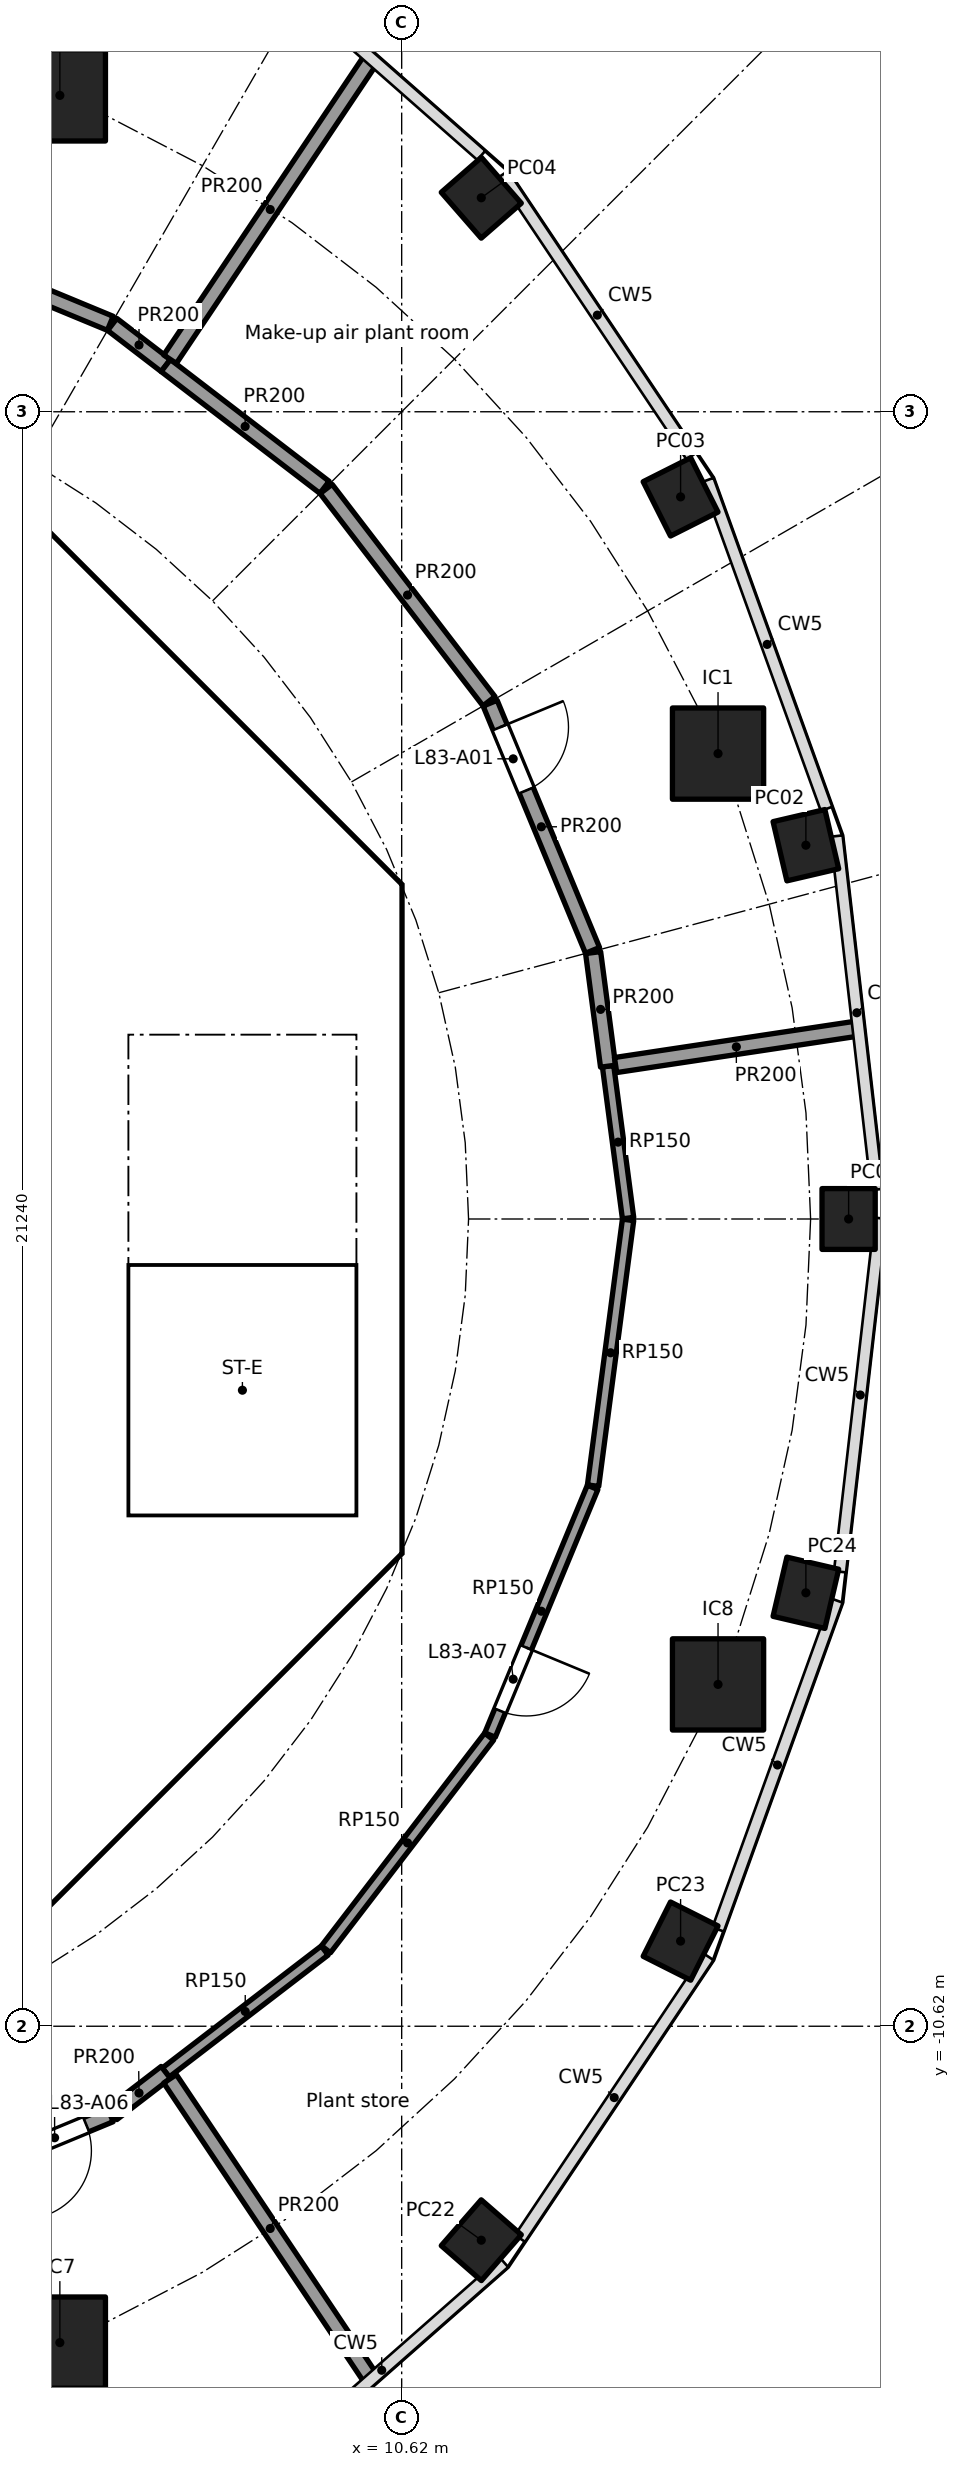
"""IFC4 building model, lengths in metres.
Left out: names, types, materials, properties, quantities, classifications, styles, units other than length and angle.
Written with IfcOpenShell. Run it as: python <this file> out.ifc"""

import sys

from ifc_helpers import new_model, si_unit, direction, frame, frame_2d, origin, origin_2d, place, context, subcontext, project, spatial, polyline, rectangle, hollow_rectangle, outline, extrude, element, fill, save


model = new_model("IFC4")
c1 = context("Model", 3, precision=1e-05, world=origin(), true_north=direction((0.0, 1.0)))
c2 = subcontext(c1, "Body", "Model", "MODEL_VIEW")
j1 = project(units=[si_unit("LENGTHUNIT", "METRE"), si_unit("PLANEANGLEUNIT", "RADIAN")], contexts=[c1])
p1 = place(None, origin())
s1 = spatial("IfcSite", under=j1, at=p1, CompositionType="ELEMENT")
p2 = place(p1, origin())
s2 = spatial("IfcBuilding", under=s1, at=p2, CompositionType="ELEMENT")
p3 = place(p2, frame((0.0, 0.0, 336.9)))
s3 = spatial("IfcBuildingStorey", under=s2, at=p3, CompositionType="ELEMENT", Elevation=336.9)
for number, where, z_axis, x_axis in (
    (1, (16.5, 0.0, 0.0), (0.0, 0.0, 1.0), (0.0, 1.0, 0.0)),
    (2, (15.938, 4.917, 0.0), (0.0, 0.0, 1.0), (-0.227, 0.974, 0.0)),
    (3, (14.289, 9.5, 0.0), (0.0, 0.0, 1.0), (-0.45, 0.893, 0.0)),
    (4, (11.667, 13.435, 0.0), (0.0, 0.0, 1.0), (-0.657, 0.754, 0.0)),
    (5, (11.667, -13.435, 0.0), (0.0, 0.0, 1.0), (0.657, 0.754, 0.0)),
    (6, (14.289, -9.5, 0.0), (0.0, 0.0, 1.0), (0.45, 0.893, 0.0)),
    (7, (15.938, -4.917, 0.0), (0.0, 0.0, 1.0), (0.227, 0.974, 0.0)),
):
    element("IfcColumn", number, at=place(p3, frame(where, z_axis=z_axis, x_axis=x_axis)), inside=s3, PredefinedType="COLUMN", context=c2, shape_type="SweptSolid", body=[
        extrude(hollow_rectangle(XDim=0.8, YDim=0.7, WallThickness=0.025, at=origin_2d()), origin(), (0.0, 0.0, 1.0), 4.0),
    ])
for number, where, z_axis, x_axis in (
    (8, (14.782, 6.123, 0.0), (0.0, 0.0, 1.0), (1.0, 0.0, 0.0)),
    (9, (6.123, 14.782, 0.0), (0.0, 0.0, 1.0), (1.0, 0.0, 0.0)),
    (10, (6.123, -14.782, 0.0), (0.0, 0.0, 1.0), (1.0, 0.0, 0.0)),
    (11, (14.782, -6.123, 0.0), (0.0, 0.0, 1.0), (1.0, 0.0, 0.0)),
):
    element("IfcColumn", number, at=place(p3, frame(where, z_axis=z_axis, x_axis=x_axis)), inside=s3, PredefinedType="COLUMN", context=c2, shape_type="SweptSolid", body=[
        extrude(rectangle(XDim=1.2, YDim=1.2, at=origin_2d()), origin(), (0.0, 0.0, 1.0), 4.0),
    ])
p4 = place(p3, frame((9.988, 4.613, 0.0), z_axis=(0.0, 0.0, 1.0), x_axis=(-0.707106781187, 0.707106781187, 0.0)))
e12 = element("IfcWall", 12, at=p4, inside=s3, PredefinedType="SHEAR", context=c2, shape_type="SweptSolid", body=[
    extrude(rectangle(XDim=7.602, YDim=0.6, at=frame_2d((3.801, 0.0))), origin(), (0.0, 0.0, 1.0), 3.7),
])
p5 = place(p4, frame((3.201, 0.0, 0.0)))
e13 = element("IfcOpeningElement", 13, at=p5, cuts=e12, PredefinedType="OPENING", context=c2, shape_type="SweptSolid", body=[
    extrude(rectangle(XDim=1.2, YDim=2.1, at=frame_2d((0.6, 1.05))), frame((0.0, 0.31, 0.0), z_axis=(0.0, -1.0, 0.0), x_axis=(1.0, 0.0, 0.0)), (0.0, 0.0, 1.0), 0.62),
])
p6 = place(p3, frame((4.613, -9.988, 0.0), z_axis=(0.0, 0.0, 1.0), x_axis=(0.707106781187, 0.707106781187, 0.0)))
e14 = element("IfcWall", 14, at=p6, inside=s3, PredefinedType="SHEAR", context=c2, shape_type="SweptSolid", body=[
    extrude(rectangle(XDim=7.602, YDim=0.6, at=frame_2d((3.801, 0.0))), origin(), (0.0, 0.0, 1.0), 3.7),
])
p7 = place(p6, frame((3.201, 0.0, 0.0)))
e15 = element("IfcOpeningElement", 15, at=p7, cuts=e14, PredefinedType="OPENING", context=c2, shape_type="SweptSolid", body=[
    extrude(rectangle(XDim=1.2, YDim=2.1, at=frame_2d((0.6, 1.05))), frame((0.0, 0.31, 0.0), z_axis=(0.0, -1.0, 0.0), x_axis=(1.0, 0.0, 0.0)), (0.0, 0.0, 1.0), 0.62),
])
p8 = place(p3, frame((-6.7, 2.0, 0.0), z_axis=(0.0, 0.0, 1.0), x_axis=(1.0, 0.0, 0.0)))
e16 = element("IfcWall", 16, at=p8, inside=s3, PredefinedType="SOLIDWALL", context=c2, shape_type="SweptSolid", body=[
    extrude(rectangle(XDim=13.4, YDim=0.2, at=frame_2d((6.7, 0.0))), origin(), (0.0, 0.0, 1.0), 3.7),
])
p9 = place(p8, frame((2.95, 0.0, 0.0)))
e17 = element("IfcOpeningElement", 17, at=p9, cuts=e16, PredefinedType="OPENING", context=c2, shape_type="SweptSolid", body=[
    extrude(rectangle(XDim=0.9, YDim=2.1, at=frame_2d((0.45, 1.05))), frame((0.0, 0.11, 0.0), z_axis=(0.0, -1.0, 0.0), x_axis=(1.0, 0.0, 0.0)), (0.0, 0.0, 1.0), 0.22),
])
p10 = place(p8, frame((8.45, 0.0, 0.0)))
e18 = element("IfcOpeningElement", 18, at=p10, cuts=e16, PredefinedType="OPENING", context=c2, shape_type="SweptSolid", body=[
    extrude(rectangle(XDim=0.9, YDim=2.1, at=frame_2d((0.45, 1.05))), frame((0.0, 0.11, 0.0), z_axis=(0.0, -1.0, 0.0), x_axis=(1.0, 0.0, 0.0)), (0.0, 0.0, 1.0), 0.22),
])
p11 = place(p8, frame((11.75, 0.0, 0.0)))
e19 = element("IfcOpeningElement", 19, at=p11, cuts=e16, PredefinedType="OPENING", context=c2, shape_type="SweptSolid", body=[
    extrude(rectangle(XDim=0.9, YDim=2.1, at=frame_2d((0.45, 1.05))), frame((0.0, 0.11, 0.0), z_axis=(0.0, -1.0, 0.0), x_axis=(1.0, 0.0, 0.0)), (0.0, 0.0, 1.0), 0.22),
])
p12 = place(p3, frame((6.7, 4.0, 0.0), z_axis=(0.0, 0.0, 1.0), x_axis=(1.0, 0.0, 0.0)))
e20 = element("IfcWall", 20, at=p12, inside=s3, PredefinedType="SOLIDWALL", context=c2, shape_type="SweptSolid", body=[
    extrude(rectangle(XDim=3.325, YDim=0.2, at=frame_2d((1.662, 0.0))), origin(), (0.0, 0.0, 1.0), 3.7),
])
p13 = place(p12, frame((1.25, 0.0, 0.0)))
e21 = element("IfcOpeningElement", 21, at=p13, cuts=e20, PredefinedType="OPENING", context=c2, shape_type="SweptSolid", body=[
    extrude(rectangle(XDim=1.1, YDim=2.1, at=frame_2d((0.55, 1.05))), frame((0.0, 0.11, 0.0), z_axis=(0.0, -1.0, 0.0), x_axis=(1.0, 0.0, 0.0)), (0.0, 0.0, 1.0), 0.22),
])
p14 = place(p3, frame((-6.7, -2.0, 0.0), z_axis=(0.0, 0.0, 1.0), x_axis=(1.0, 0.0, 0.0)))
e22 = element("IfcWall", 22, at=p14, inside=s3, PredefinedType="SOLIDWALL", context=c2, shape_type="SweptSolid", body=[
    extrude(rectangle(XDim=13.4, YDim=0.2, at=frame_2d((6.7, 0.0))), origin(), (0.0, 0.0, 1.0), 3.7),
])
p15 = place(p14, frame((1.85, 0.0, 0.0)))
e23 = element("IfcOpeningElement", 23, at=p15, cuts=e22, PredefinedType="OPENING", context=c2, shape_type="SweptSolid", body=[
    extrude(rectangle(XDim=0.9, YDim=2.1, at=frame_2d((0.45, 1.05))), frame((0.0, 0.11, 0.0), z_axis=(0.0, -1.0, 0.0), x_axis=(1.0, 0.0, 0.0)), (0.0, 0.0, 1.0), 0.22),
])
p16 = place(p14, frame((6.25, 0.0, 0.0)))
e24 = element("IfcOpeningElement", 24, at=p16, cuts=e22, PredefinedType="OPENING", context=c2, shape_type="SweptSolid", body=[
    extrude(rectangle(XDim=0.9, YDim=2.1, at=frame_2d((0.45, 1.05))), frame((0.0, 0.11, 0.0), z_axis=(0.0, -1.0, 0.0), x_axis=(1.0, 0.0, 0.0)), (0.0, 0.0, 1.0), 0.22),
])
p17 = place(p14, frame((10.65, 0.0, 0.0)))
e25 = element("IfcOpeningElement", 25, at=p17, cuts=e22, PredefinedType="OPENING", context=c2, shape_type="SweptSolid", body=[
    extrude(rectangle(XDim=0.9, YDim=2.1, at=frame_2d((0.45, 1.05))), frame((0.0, 0.11, 0.0), z_axis=(0.0, -1.0, 0.0), x_axis=(1.0, 0.0, 0.0)), (0.0, 0.0, 1.0), 0.22),
])
p18 = place(p3, origin())
e26 = element("IfcWall", 26, at=p18, inside=s3, PredefinedType="SHEAR", context=c2, shape_type="SweptSolid", body=[
    extrude(outline(polyline([(9.776, -4.401), (10.025, -4.152), (10.025, -3.801), (10.025, 4.152), (9.776, 4.401), (10.2, 4.825), (10.625, 4.401), (10.625, -4.401), (10.2, -4.825), (9.776, -4.401)])), origin(), (0.0, 0.0, 1.0), 3.7),
])
p19 = place(p3, origin())
e27 = element("IfcWall", 27, at=p19, inside=s3, PredefinedType="SOLIDWALL", context=c2, shape_type="SweptSolid", body=[
    extrude(outline(polyline([(-6.7, -2.1), (-6.5, -2.1), (-6.5, -4.1), (-2.3, -4.1), (-2.3, -2.1), (-2.1, -2.1), (-2.1, -4.1), (2.1, -4.1), (2.1, -2.1), (2.3, -2.1), (2.3, -4.1), (6.5, -4.1), (6.5, -2.1), (6.7, -2.1), (6.7, -4.3), (-6.7, -4.3), (-6.7, -2.1)])), origin(), (0.0, 0.0, 1.0), 3.7),
])
p20 = place(p3, origin())
e28 = element("IfcWall", 28, at=p20, inside=s3, PredefinedType="SOLIDWALL", context=c2, shape_type="SweptSolid", body=[
    extrude(outline(polyline([(-6.7, 4.3), (6.7, 4.3), (6.7, 2.1), (6.5, 2.1), (6.5, 4.1), (4.5, 4.1), (4.5, 2.1), (4.3, 2.1), (4.3, 4.1), (0.1, 4.1), (0.1, 2.1), (-0.1, 2.1), (-0.1, 4.1), (-6.5, 4.1), (-6.5, 2.1), (-6.7, 2.1), (-6.7, 4.3)])), origin(), (0.0, 0.0, 1.0), 3.7),
])
p21 = place(p3, origin())
e29 = element("IfcWall", 29, at=p21, inside=s3, PredefinedType="SOLIDWALL", context=c2, shape_type="SweptSolid", body=[
    extrude(outline(polyline([(7.025, -3.9), (6.7, -3.9), (6.7, 3.9), (7.025, 3.9), (7.025, -3.9)])), origin(), (0.0, 0.0, 1.0), 3.7),
])
p22 = place(p3, origin())
e30 = element("IfcWall", 30, at=p22, inside=s3, PredefinedType="SOLIDWALL", context=c2, shape_type="SweptSolid", body=[
    extrude(outline(polyline([(10.025, -4.1), (6.7, -4.1), (6.7, -3.9), (10.025, -3.9), (10.025, -4.1)])), origin(), (0.0, 0.0, 1.0), 3.7),
])
p23 = place(p3, frame((9.607, -9.624, 0.0), z_axis=(0.0, 0.0, 1.0), x_axis=(-0.793381127635, -0.608725214126, 0.0)))
e31 = element("IfcWall", 31, at=p23, inside=s3, PredefinedType="PARTITIONING", context=c2, shape_type="SweptSolid", body=[
    extrude(rectangle(XDim=2.635, YDim=0.15, at=frame_2d((1.317, 0.0))), origin(), (0.0, 0.0, 1.0), 3.7),
])
p24 = place(p3, frame((11.771, -6.809, 0.0), z_axis=(0.0, 0.0, 1.0), x_axis=(-0.608736710054, -0.793372307201, 0.0)))
e32 = element("IfcWall", 32, at=p24, inside=s3, PredefinedType="PARTITIONING", context=c2, shape_type="SweptSolid", body=[
    extrude(rectangle(XDim=3.527, YDim=0.15, at=frame_2d((1.763, 0.0))), origin(), (0.0, 0.0, 1.0), 3.7),
])
p25 = place(p3, frame((13.132, -3.531, 0.0), z_axis=(0.0, 0.0, 1.0), x_axis=(-0.382677866108, -0.923881838111, 0.0)))
e33 = element("IfcWall", 33, at=p25, inside=s3, PredefinedType="PARTITIONING", context=c2, shape_type="SweptSolid", body=[
    extrude(rectangle(XDim=3.527, YDim=0.15, at=frame_2d((1.763, 0.0))), origin(), (0.0, 0.0, 1.0), 3.7),
])
p26 = place(p25, frame((2.281, 0.0, 0.0)))
e34 = element("IfcOpeningElement", 34, at=p26, cuts=e33, PredefinedType="OPENING", context=c2, shape_type="SweptSolid", body=[
    extrude(rectangle(XDim=0.9, YDim=2.1, at=frame_2d((0.45, 1.05))), frame((0.0, 0.085, 0.0), z_axis=(0.0, -1.0, 0.0), x_axis=(1.0, 0.0, 0.0)), (0.0, 0.0, 1.0), 0.17),
])
p27 = place(p3, frame((13.335, 2.01, 0.0), z_axis=(0.0, 0.0, 1.0), x_axis=(0.130545357325, -0.991442338051, 0.0)))
e35 = element("IfcWall", 35, at=p27, inside=s3, PredefinedType="PARTITIONING", context=c2, shape_type="SweptSolid", body=[
    extrude(rectangle(XDim=2.016, YDim=0.15, at=frame_2d((1.008, 0.0))), origin(), (0.0, 0.0, 1.0), 3.7),
])
p28 = place(p3, frame((13.598, -0.012, 0.0), z_axis=(0.0, 0.0, 1.0), x_axis=(-0.130499283623, -0.991448403586, 0.0)))
e36 = element("IfcWall", 36, at=p28, inside=s3, PredefinedType="PARTITIONING", context=c2, shape_type="SweptSolid", body=[
    extrude(rectangle(XDim=3.527, YDim=0.15, at=frame_2d((1.763, 0.0))), origin(), (0.0, 0.0, 1.0), 3.7),
])
p29 = place(p3, frame((3.534, 13.131, 0.0), z_axis=(0.0, 0.0, 1.0), x_axis=(0.92386297064, -0.382723413813, 0.0)))
e37 = element("IfcWall", 37, at=p29, inside=s3, PredefinedType="PARTITIONING", context=c2, shape_type="SweptSolid", body=[
    extrude(rectangle(XDim=3.52, YDim=0.2, at=frame_2d((1.76, 0.0))), origin(), (0.0, 0.0, 1.0), 3.7),
])
p30 = place(p3, frame((6.786, -11.784, 0.0), z_axis=(0.0, 0.0, 1.0), x_axis=(-0.92386297064, -0.382723413813, 0.0)))
e38 = element("IfcWall", 38, at=p30, inside=s3, PredefinedType="PARTITIONING", context=c2, shape_type="SweptSolid", body=[
    extrude(rectangle(XDim=3.52, YDim=0.2, at=frame_2d((1.76, 0.0))), origin(), (0.0, 0.0, 1.0), 3.7),
])
p31 = place(p30, frame((0.342, 0.0, 0.0)))
e39 = element("IfcOpeningElement", 39, at=p31, cuts=e38, PredefinedType="OPENING", context=c2, shape_type="SweptSolid", body=[
    extrude(rectangle(XDim=0.9, YDim=2.1, at=frame_2d((0.45, 1.05))), frame((0.0, 0.11, 0.0), z_axis=(0.0, -1.0, 0.0), x_axis=(1.0, 0.0, 0.0)), (0.0, 0.0, 1.0), 0.22),
])
for number, where, z_axis, x_axis in (
    (40, (6.812, 11.769, 0.0), (0.0, 0.0, 1.0), (0.793, -0.609, 0.0)),
    (41, (7.517, -11.228, 0.0), (0.0, 0.0, 1.0), (-0.793, -0.609, 0.0)),
):
    element("IfcWall", number, at=place(p3, frame(where, z_axis=z_axis, x_axis=x_axis)), inside=s3, PredefinedType="PARTITIONING", context=c2, shape_type="SweptSolid", body=[
        extrude(rectangle(XDim=0.888, YDim=0.2, at=frame_2d((0.444, 0.0))), origin(), (0.0, 0.0, 1.0), 3.7),
    ])
p32 = place(p3, frame((7.517, 11.228, 0.0), z_axis=(0.0, 0.0, 1.0), x_axis=(0.793395797287, -0.608706093979, 0.0)))
e42 = element("IfcWall", 42, at=p32, inside=s3, PredefinedType="PARTITIONING", context=c2, shape_type="SweptSolid", body=[
    extrude(rectangle(XDim=2.632, YDim=0.2, at=frame_2d((1.316, 0.0))), origin(), (0.0, 0.0, 1.0), 3.7),
])
p33 = place(p3, frame((7.572, 11.311, 0.0), z_axis=(0.0, 0.0, 1.0), x_axis=(0.55629198168, 0.830986901893, 0.0)))
e43 = element("IfcWall", 43, at=p33, inside=s3, PredefinedType="PARTITIONING", context=c2, shape_type="SweptSolid", body=[
    extrude(rectangle(XDim=4.74, YDim=0.2, at=frame_2d((2.37, 0.0))), origin(), (0.0, 0.0, 1.0), 3.7),
])
p34 = place(p3, frame((9.626, 9.605, 0.0), z_axis=(0.0, 0.0, 1.0), x_axis=(0.608697977542, -0.793402024283, 0.0)))
e44 = element("IfcWall", 44, at=p34, inside=s3, PredefinedType="PARTITIONING", context=c2, shape_type="SweptSolid", body=[
    extrude(rectangle(XDim=3.52, YDim=0.2, at=frame_2d((1.76, 0.0))), origin(), (0.0, 0.0, 1.0), 3.7),
])
p35 = place(p3, frame((10.209, -15.25, 0.0), z_axis=(0.0, 0.0, 1.0), x_axis=(-0.55629198168, 0.830986901893, 0.0)))
e45 = element("IfcWall", 45, at=p35, inside=s3, PredefinedType="PARTITIONING", context=c2, shape_type="SweptSolid", body=[
    extrude(rectangle(XDim=4.74, YDim=0.2, at=frame_2d((2.37, 0.0))), origin(), (0.0, 0.0, 1.0), 3.7),
])
p36 = place(p3, frame((11.784, 6.786, 0.0), z_axis=(0.0, 0.0, 1.0), x_axis=(0.382723413813, -0.92386297064, 0.0)))
e46 = element("IfcWall", 46, at=p36, inside=s3, PredefinedType="PARTITIONING", context=c2, shape_type="SweptSolid", body=[
    extrude(rectangle(XDim=3.52, YDim=0.2, at=frame_2d((1.76, 0.0))), origin(), (0.0, 0.0, 1.0), 3.7),
])
p37 = place(p36, frame((0.342, 0.0, 0.0)))
e47 = element("IfcOpeningElement", 47, at=p37, cuts=e46, PredefinedType="OPENING", context=c2, shape_type="SweptSolid", body=[
    extrude(rectangle(XDim=0.9, YDim=2.1, at=frame_2d((0.45, 1.05))), frame((0.0, 0.11, 0.0), z_axis=(0.0, -1.0, 0.0), x_axis=(1.0, 0.0, 0.0)), (0.0, 0.0, 1.0), 0.22),
])
p38 = place(p3, frame((13.139, 3.505, 0.0), z_axis=(0.0, 0.0, 1.0), x_axis=(0.130391662061, -0.99146256332, 0.0)))
e48 = element("IfcWall", 48, at=p38, inside=s3, PredefinedType="PARTITIONING", context=c2, shape_type="SweptSolid", body=[
    extrude(rectangle(XDim=1.507, YDim=0.2, at=frame_2d((0.754, 0.0))), origin(), (0.0, 0.0, 1.0), 3.7),
])
p39 = place(p3, frame((13.434, 2.025, 0.0), z_axis=(0.0, 0.0, 1.0), x_axis=(0.988817905908, 0.149127961685, 0.0)))
e49 = element("IfcWall", 49, at=p39, inside=s3, PredefinedType="PARTITIONING", context=c2, shape_type="SweptSolid", body=[
    extrude(rectangle(XDim=3.214, YDim=0.2, at=frame_2d((1.607, 0.0))), origin(), (0.0, 0.0, 1.0), 3.7),
])
p40 = place(p13, frame((1.1, 0.0, 0.0), x_axis=(-1.0, 0.0, 0.0)))
e50 = element("IfcDoor", 50, at=p40, inside=s3, OperationType="SINGLE_SWING_LEFT", PredefinedType="DOOR", context=c2, shape_type="SweptSolid", body=[
    extrude(rectangle(XDim=1.1, YDim=2.1, at=frame_2d((0.55, 1.05))), frame((0.0, 0.025, 0.0), z_axis=(0.0, -1.0, 0.0), x_axis=(1.0, 0.0, 0.0)), (0.0, 0.0, 1.0), 0.05),
])
fill(e21, e50)
p41 = place(p5, origin())
e51 = element("IfcDoor", 51, at=p41, inside=s3, OperationType="SINGLE_SWING_RIGHT", PredefinedType="DOOR", context=c2, shape_type="SweptSolid", body=[
    extrude(rectangle(XDim=1.2, YDim=2.1, at=frame_2d((0.6, 1.05))), frame((0.0, 0.025, 0.0), z_axis=(0.0, -1.0, 0.0), x_axis=(1.0, 0.0, 0.0)), (0.0, 0.0, 1.0), 0.05),
])
fill(e13, e51)
p42 = place(p7, origin())
e52 = element("IfcDoor", 52, at=p42, inside=s3, OperationType="SINGLE_SWING_RIGHT", PredefinedType="DOOR", context=c2, shape_type="SweptSolid", body=[
    extrude(rectangle(XDim=1.2, YDim=2.1, at=frame_2d((0.6, 1.05))), frame((0.0, 0.025, 0.0), z_axis=(0.0, -1.0, 0.0), x_axis=(1.0, 0.0, 0.0)), (0.0, 0.0, 1.0), 0.05),
])
fill(e15, e52)
p43 = place(p37, origin())
e53 = element("IfcDoor", 53, at=p43, inside=s3, OperationType="SINGLE_SWING_LEFT", PredefinedType="DOOR", context=c2, shape_type="SweptSolid", body=[
    extrude(rectangle(XDim=0.9, YDim=2.1, at=frame_2d((0.45, 1.05))), frame((0.0, 0.025, 0.0), z_axis=(0.0, -1.0, 0.0), x_axis=(1.0, 0.0, 0.0)), (0.0, 0.0, 1.0), 0.05),
])
fill(e47, e53)
p44 = place(p31, origin())
e54 = element("IfcDoor", 54, at=p44, inside=s3, OperationType="SINGLE_SWING_RIGHT", PredefinedType="DOOR", context=c2, shape_type="SweptSolid", body=[
    extrude(rectangle(XDim=0.9, YDim=2.1, at=frame_2d((0.45, 1.05))), frame((0.0, 0.025, 0.0), z_axis=(0.0, -1.0, 0.0), x_axis=(1.0, 0.0, 0.0)), (0.0, 0.0, 1.0), 0.05),
])
fill(e39, e54)
p45 = place(p26, origin())
e55 = element("IfcDoor", 55, at=p45, inside=s3, OperationType="SINGLE_SWING_LEFT", PredefinedType="DOOR", context=c2, shape_type="SweptSolid", body=[
    extrude(rectangle(XDim=0.9, YDim=2.1, at=frame_2d((0.45, 1.05))), frame((0.0, 0.025, 0.0), z_axis=(0.0, -1.0, 0.0), x_axis=(1.0, 0.0, 0.0)), (0.0, 0.0, 1.0), 0.05),
])
fill(e34, e55)
save(model, sys.argv[1])
